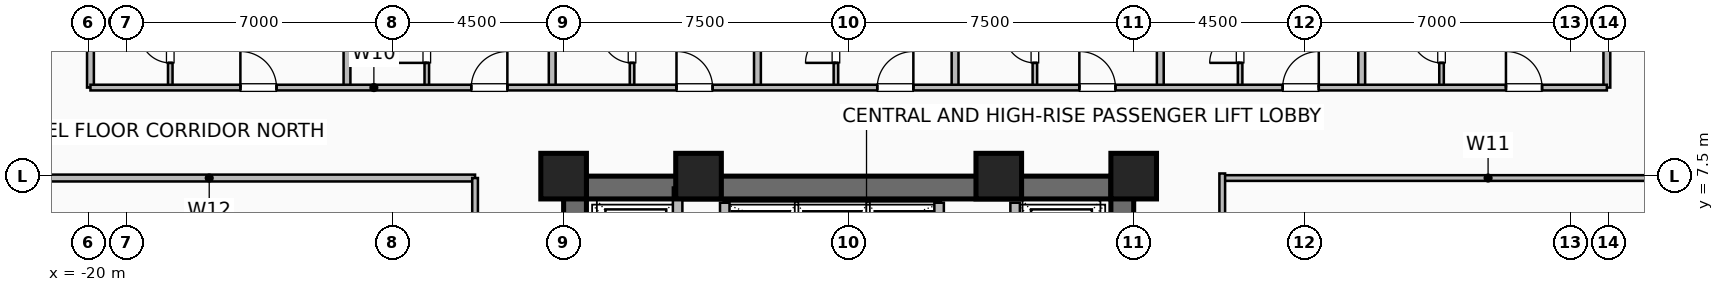
"""IFC4 building model, lengths in metres.
Left out: names, types, materials, properties, quantities, classifications, styles, units other than length and angle.
Written with IfcOpenShell. Run it as: python <this file> out.ifc"""

import sys

from ifc_helpers import new_model, si_unit, direction, frame, frame_2d, origin, origin_2d, place, context, subcontext, project, spatial, rectangle, hollow_rectangle, extrude, element, fill, save


model = new_model("IFC4")
c1 = context("Model", 3, precision=1e-05, world=origin(), true_north=direction((0.0, 1.0)))
c2 = subcontext(c1, "Body", "Model", "MODEL_VIEW")
j1 = project(units=[si_unit("LENGTHUNIT", "METRE"), si_unit("PLANEANGLEUNIT", "RADIAN")], contexts=[c1])
p1 = place(None, origin())
s1 = spatial("IfcSite", under=j1, at=p1, CompositionType="ELEMENT")
p2 = place(p1, origin())
s2 = spatial("IfcBuilding", under=s1, at=p2, CompositionType="ELEMENT")
p3 = place(p2, frame((0.0, 0.0, 27.0)))
s3 = spatial("IfcBuildingStorey", under=s2, at=p3, CompositionType="ELEMENT", Elevation=27.0)
for number, where, z_axis, x_axis in (
    (1, (7.5, 7.5, 0.0), (0.0, 0.0, 1.0), (1.0, 0.0, 0.0)),
    (2, (3.95, 7.5, 0.0), (0.0, 0.0, 1.0), (1.0, 0.0, 0.0)),
    (3, (-3.95, 7.5, 0.0), (0.0, 0.0, 1.0), (1.0, 0.0, 0.0)),
    (4, (-7.5, 7.5, 0.0), (0.0, 0.0, 1.0), (1.0, 0.0, 0.0)),
):
    element("IfcColumn", number, at=place(p3, frame(where, z_axis=z_axis, x_axis=x_axis)), inside=s3, PredefinedType="COLUMN", context=c2, shape_type="SweptSolid", body=[
        extrude(hollow_rectangle(XDim=1.2, YDim=1.2, WallThickness=0.055, at=origin_2d()), origin(), (0.0, 0.0, 1.0), 3.5),
    ])
p4 = place(p3, frame((-7.5, 7.2, 0.0), z_axis=(0.0, 0.0, 1.0), x_axis=(1.0, 0.0, 0.0)))
e5 = element("IfcWall", 5, at=p4, inside=s3, PredefinedType="SHEAR", context=c2, shape_type="SweptSolid", body=[
    extrude(rectangle(XDim=15.0, YDim=0.6, at=frame_2d((7.5, 0.0))), origin(), (0.0, 0.0, 1.0), 3.25),
])
p5 = place(p3, frame((-7.2, -7.5, 0.0), z_axis=(0.0, 0.0, 1.0), x_axis=(0.0, 1.0, 0.0)))
e6 = element("IfcWall", 6, at=p5, inside=s3, PredefinedType="SHEAR", context=c2, shape_type="SweptSolid", body=[
    extrude(rectangle(XDim=15.0, YDim=0.6, at=frame_2d((7.5, 0.0))), origin(), (0.0, 0.0, 1.0), 3.25),
])
p6 = place(p5, frame((9.5, 0.0, 0.0)))
e7 = element("IfcOpeningElement", 7, at=p6, cuts=e6, PredefinedType="OPENING", context=c2, shape_type="SweptSolid", body=[
    extrude(rectangle(XDim=1.0, YDim=2.08, at=frame_2d((0.5, 1.04))), frame((0.0, 0.31, 0.0), z_axis=(0.0, -1.0, 0.0), x_axis=(1.0, 0.0, 0.0)), (0.0, 0.0, 1.0), 0.62),
])
p7 = place(p3, frame((7.2, -7.5, 0.0), z_axis=(0.0, 0.0, 1.0), x_axis=(0.0, 1.0, 0.0)))
e8 = element("IfcWall", 8, at=p7, inside=s3, PredefinedType="SHEAR", context=c2, shape_type="SweptSolid", body=[
    extrude(rectangle(XDim=15.0, YDim=0.6, at=frame_2d((7.5, 0.0))), origin(), (0.0, 0.0, 1.0), 3.25),
])
for number, where, z_axis, x_axis in (
    (9, (-3.26, 4.58, 0.0), (0.0, 0.0, 1.0), (0.0, 1.0, 0.0)),
    (10, (2.38, 4.58, 0.0), (0.0, 0.0, 1.0), (0.0, 1.0, 0.0)),
):
    element("IfcWall", number, at=place(p3, frame(where, z_axis=z_axis, x_axis=x_axis)), inside=s3, PredefinedType="SHEAR", context=c2, shape_type="SweptSolid", body=[
        extrude(rectangle(XDim=2.22, YDim=0.25, at=frame_2d((1.11, 0.0))), origin(), (0.0, 0.0, 1.0), 3.25),
    ])
p8 = place(p3, frame((-4.5, 4.35, 0.0), z_axis=(0.0, 0.0, 1.0), x_axis=(0.0, 1.0, 0.0)))
e11 = element("IfcWall", 11, at=p8, inside=s3, PredefinedType="SHEAR", context=c2, shape_type="SweptSolid", body=[
    extrude(rectangle(XDim=2.85, YDim=0.25, at=frame_2d((1.425, 0.0))), origin(), (0.0, 0.0, 1.0), 3.25),
])
p9 = place(p3, frame((4.38, 4.3, 0.0), z_axis=(0.0, 0.0, 1.0), x_axis=(0.0, 1.0, 0.0)))
e12 = element("IfcWall", 12, at=p9, inside=s3, PredefinedType="SHEAR", context=c2, shape_type="SweptSolid", body=[
    extrude(rectangle(XDim=2.5, YDim=0.25, at=frame_2d((1.25, 0.0))), origin(), (0.0, 0.0, 1.0), 3.25),
])
p10 = place(p9, frame((0.8, 0.0, 0.0)))
e13 = element("IfcOpeningElement", 13, at=p10, cuts=e12, PredefinedType="OPENING", context=c2, shape_type="SweptSolid", body=[
    extrude(rectangle(XDim=1.2, YDim=2.2, at=frame_2d((0.6, 1.1))), frame((0.0, 0.135, 0.0), z_axis=(0.0, -1.0, 0.0), x_axis=(1.0, 0.0, 0.0)), (0.0, 0.0, 1.0), 0.27),
])
p11 = place(p3, frame((-17.85, 9.83, 0.0), z_axis=(0.0, 0.0, 1.0), x_axis=(0.0, 1.0, 0.0)))
e14 = element("IfcWall", 14, at=p11, inside=s3, PredefinedType="PLUMBINGWALL", context=c2, shape_type="SweptSolid", body=[
    extrude(rectangle(XDim=2.25, YDim=0.12, at=frame_2d((1.125, 0.0))), origin(), (0.0, 0.0, 1.0), 3.25),
])
p12 = place(p11, frame((0.65, 0.0, 0.0)))
e15 = element("IfcOpeningElement", 15, at=p12, cuts=e14, PredefinedType="OPENING", context=c2, shape_type="SweptSolid", body=[
    extrude(rectangle(XDim=0.8, YDim=2.05, at=frame_2d((0.4, 1.025))), frame((0.0, 0.07, 0.0), z_axis=(0.0, -1.0, 0.0), x_axis=(1.0, 0.0, 0.0)), (0.0, 0.0, 1.0), 0.14),
])
p13 = place(p3, frame((-11.1, 9.83, 0.0), z_axis=(0.0, 0.0, 1.0), x_axis=(0.0, 1.0, 0.0)))
e16 = element("IfcWall", 16, at=p13, inside=s3, PredefinedType="PLUMBINGWALL", context=c2, shape_type="SweptSolid", body=[
    extrude(rectangle(XDim=2.25, YDim=0.12, at=frame_2d((1.125, 0.0))), origin(), (0.0, 0.0, 1.0), 3.25),
])
p14 = place(p13, frame((0.65, 0.0, 0.0)))
e17 = element("IfcOpeningElement", 17, at=p14, cuts=e16, PredefinedType="OPENING", context=c2, shape_type="SweptSolid", body=[
    extrude(rectangle(XDim=0.8, YDim=2.05, at=frame_2d((0.4, 1.025))), frame((0.0, 0.07, 0.0), z_axis=(0.0, -1.0, 0.0), x_axis=(1.0, 0.0, 0.0)), (0.0, 0.0, 1.0), 0.14),
])
p15 = place(p3, frame((-5.7, 9.83, 0.0), z_axis=(0.0, 0.0, 1.0), x_axis=(0.0, 1.0, 0.0)))
e18 = element("IfcWall", 18, at=p15, inside=s3, PredefinedType="PLUMBINGWALL", context=c2, shape_type="SweptSolid", body=[
    extrude(rectangle(XDim=2.25, YDim=0.12, at=frame_2d((1.125, 0.0))), origin(), (0.0, 0.0, 1.0), 3.25),
])
p16 = place(p15, frame((0.65, 0.0, 0.0)))
e19 = element("IfcOpeningElement", 19, at=p16, cuts=e18, PredefinedType="OPENING", context=c2, shape_type="SweptSolid", body=[
    extrude(rectangle(XDim=0.8, YDim=2.05, at=frame_2d((0.4, 1.025))), frame((0.0, 0.07, 0.0), z_axis=(0.0, -1.0, 0.0), x_axis=(1.0, 0.0, 0.0)), (0.0, 0.0, 1.0), 0.14),
])
p17 = place(p3, frame((-0.335, 9.83, 0.0), z_axis=(0.0, 0.0, 1.0), x_axis=(0.0, 1.0, 0.0)))
e20 = element("IfcWall", 20, at=p17, inside=s3, PredefinedType="PLUMBINGWALL", context=c2, shape_type="SweptSolid", body=[
    extrude(rectangle(XDim=2.25, YDim=0.12, at=frame_2d((1.125, 0.0))), origin(), (0.0, 0.0, 1.0), 3.25),
])
p18 = place(p17, frame((0.65, 0.0, 0.0)))
e21 = element("IfcOpeningElement", 21, at=p18, cuts=e20, PredefinedType="OPENING", context=c2, shape_type="SweptSolid", body=[
    extrude(rectangle(XDim=0.8, YDim=2.05, at=frame_2d((0.4, 1.025))), frame((0.0, 0.07, 0.0), z_axis=(0.0, -1.0, 0.0), x_axis=(1.0, 0.0, 0.0)), (0.0, 0.0, 1.0), 0.14),
])
p19 = place(p3, frame((4.9, 9.83, 0.0), z_axis=(0.0, 0.0, 1.0), x_axis=(0.0, 1.0, 0.0)))
e22 = element("IfcWall", 22, at=p19, inside=s3, PredefinedType="PLUMBINGWALL", context=c2, shape_type="SweptSolid", body=[
    extrude(rectangle(XDim=2.25, YDim=0.12, at=frame_2d((1.125, 0.0))), origin(), (0.0, 0.0, 1.0), 2.818),
])
p20 = place(p19, frame((0.65, 0.0, 0.0)))
e23 = element("IfcOpeningElement", 23, at=p20, cuts=e22, PredefinedType="OPENING", context=c2, shape_type="SweptSolid", body=[
    extrude(rectangle(XDim=0.8, YDim=2.05, at=frame_2d((0.4, 1.025))), frame((0.0, 0.07, 0.0), z_axis=(0.0, -1.0, 0.0), x_axis=(1.0, 0.0, 0.0)), (0.0, 0.0, 1.0), 0.14),
])
p21 = place(p3, frame((10.3, 9.83, 0.0), z_axis=(0.0, 0.0, 1.0), x_axis=(0.0, 1.0, 0.0)))
e24 = element("IfcWall", 24, at=p21, inside=s3, PredefinedType="PLUMBINGWALL", context=c2, shape_type="SweptSolid", body=[
    extrude(rectangle(XDim=2.25, YDim=0.12, at=frame_2d((1.125, 0.0))), origin(), (0.0, 0.0, 1.0), 3.25),
])
p22 = place(p21, frame((0.65, 0.0, 0.0)))
e25 = element("IfcOpeningElement", 25, at=p22, cuts=e24, PredefinedType="OPENING", context=c2, shape_type="SweptSolid", body=[
    extrude(rectangle(XDim=0.8, YDim=2.05, at=frame_2d((0.4, 1.025))), frame((0.0, 0.07, 0.0), z_axis=(0.0, -1.0, 0.0), x_axis=(1.0, 0.0, 0.0)), (0.0, 0.0, 1.0), 0.14),
])
p23 = place(p3, frame((15.6, 9.83, 0.0), z_axis=(0.0, 0.0, 1.0), x_axis=(0.0, 1.0, 0.0)))
e26 = element("IfcWall", 26, at=p23, inside=s3, PredefinedType="PLUMBINGWALL", context=c2, shape_type="SweptSolid", body=[
    extrude(rectangle(XDim=2.25, YDim=0.12, at=frame_2d((1.125, 0.0))), origin(), (0.0, 0.0, 1.0), 3.25),
])
p24 = place(p23, frame((0.65, 0.0, 0.0)))
e27 = element("IfcOpeningElement", 27, at=p24, cuts=e26, PredefinedType="OPENING", context=c2, shape_type="SweptSolid", body=[
    extrude(rectangle(XDim=0.8, YDim=2.05, at=frame_2d((0.4, 1.025))), frame((0.0, 0.07, 0.0), z_axis=(0.0, -1.0, 0.0), x_axis=(1.0, 0.0, 0.0)), (0.0, 0.0, 1.0), 0.14),
])
for number, where, z_axis, x_axis in (
    (28, (-19.95, 9.83, 0.0), (0.0, 0.0, 1.0), (0.0, 1.0, 0.0)),
    (29, (-13.2, 9.83, 0.0), (0.0, 0.0, 1.0), (0.0, 1.0, 0.0)),
    (30, (-7.8, 9.83, 0.0), (0.0, 0.0, 1.0), (0.0, 1.0, 0.0)),
    (31, (-2.4, 9.83, 0.0), (0.0, 0.0, 1.0), (0.0, 1.0, 0.0)),
    (32, (2.8, 9.83, 0.0), (0.0, 0.0, 1.0), (0.0, 1.0, 0.0)),
    (33, (8.2, 9.83, 0.0), (0.0, 0.0, 1.0), (0.0, 1.0, 0.0)),
    (34, (13.5, 9.83, 0.0), (0.0, 0.0, 1.0), (0.0, 1.0, 0.0)),
    (35, (19.95, 9.83, 0.0), (0.0, 0.0, 1.0), (0.0, 1.0, 0.0)),
):
    element("IfcWall", number, at=place(p3, frame(where, z_axis=z_axis, x_axis=x_axis)), inside=s3, PredefinedType="PARTITIONING", context=c2, shape_type="SweptSolid", body=[
        extrude(rectangle(XDim=13.99, YDim=0.18, at=frame_2d((6.995, 0.0))), origin(), (0.0, 0.0, 1.0), 3.25),
    ])
p25 = place(p3, frame((-19.95, 9.83, 0.0), z_axis=(0.0, 0.0, 1.0), x_axis=(1.0, 0.0, 0.0)))
e36 = element("IfcWall", 36, at=p25, inside=s3, PredefinedType="PARTITIONING", context=c2, shape_type="SweptSolid", body=[
    extrude(rectangle(XDim=39.9, YDim=0.15, at=frame_2d((19.95, 0.0))), origin(), (0.0, 0.0, 1.0), 3.25),
])
p26 = place(p25, frame((3.945, 0.0, 0.0)))
e37 = element("IfcOpeningElement", 37, at=p26, cuts=e36, PredefinedType="OPENING", context=c2, shape_type="SweptSolid", body=[
    extrude(rectangle(XDim=0.95, YDim=2.08, at=frame_2d((0.475, 1.04))), frame((0.0, 0.085, 0.0), z_axis=(0.0, -1.0, 0.0), x_axis=(1.0, 0.0, 0.0)), (0.0, 0.0, 1.0), 0.17),
])
p27 = place(p25, frame((10.02, 0.0, 0.0)))
e38 = element("IfcOpeningElement", 38, at=p27, cuts=e36, PredefinedType="OPENING", context=c2, shape_type="SweptSolid", body=[
    extrude(rectangle(XDim=0.95, YDim=2.08, at=frame_2d((0.475, 1.04))), frame((0.0, 0.085, 0.0), z_axis=(0.0, -1.0, 0.0), x_axis=(1.0, 0.0, 0.0)), (0.0, 0.0, 1.0), 0.17),
])
p28 = place(p25, frame((15.42, 0.0, 0.0)))
e39 = element("IfcOpeningElement", 39, at=p28, cuts=e36, PredefinedType="OPENING", context=c2, shape_type="SweptSolid", body=[
    extrude(rectangle(XDim=0.95, YDim=2.08, at=frame_2d((0.475, 1.04))), frame((0.0, 0.085, 0.0), z_axis=(0.0, -1.0, 0.0), x_axis=(1.0, 0.0, 0.0)), (0.0, 0.0, 1.0), 0.17),
])
p29 = place(p25, frame((20.702, 0.0, 0.0)))
e40 = element("IfcOpeningElement", 40, at=p29, cuts=e36, PredefinedType="OPENING", context=c2, shape_type="SweptSolid", body=[
    extrude(rectangle(XDim=0.95, YDim=2.08, at=frame_2d((0.475, 1.04))), frame((0.0, 0.085, 0.0), z_axis=(0.0, -1.0, 0.0), x_axis=(1.0, 0.0, 0.0)), (0.0, 0.0, 1.0), 0.17),
])
p30 = place(p25, frame((26.02, 0.0, 0.0)))
e41 = element("IfcOpeningElement", 41, at=p30, cuts=e36, PredefinedType="OPENING", context=c2, shape_type="SweptSolid", body=[
    extrude(rectangle(XDim=0.95, YDim=2.08, at=frame_2d((0.475, 1.04))), frame((0.0, 0.085, 0.0), z_axis=(0.0, -1.0, 0.0), x_axis=(1.0, 0.0, 0.0)), (0.0, 0.0, 1.0), 0.17),
])
p31 = place(p25, frame((31.37, 0.0, 0.0)))
e42 = element("IfcOpeningElement", 42, at=p31, cuts=e36, PredefinedType="OPENING", context=c2, shape_type="SweptSolid", body=[
    extrude(rectangle(XDim=0.95, YDim=2.08, at=frame_2d((0.475, 1.04))), frame((0.0, 0.085, 0.0), z_axis=(0.0, -1.0, 0.0), x_axis=(1.0, 0.0, 0.0)), (0.0, 0.0, 1.0), 0.17),
])
p32 = place(p25, frame((37.245, 0.0, 0.0)))
e43 = element("IfcOpeningElement", 43, at=p32, cuts=e36, PredefinedType="OPENING", context=c2, shape_type="SweptSolid", body=[
    extrude(rectangle(XDim=0.95, YDim=2.08, at=frame_2d((0.475, 1.04))), frame((0.0, 0.085, 0.0), z_axis=(0.0, -1.0, 0.0), x_axis=(1.0, 0.0, 0.0)), (0.0, 0.0, 1.0), 0.17),
])
p33 = place(p3, frame((-23.82, 7.45, 0.0), z_axis=(0.0, 0.0, 1.0), x_axis=(1.0, 0.0, 0.0)))
e44 = element("IfcWall", 44, at=p33, inside=s3, PredefinedType="PARTITIONING", context=c2, shape_type="SweptSolid", body=[
    extrude(rectangle(XDim=13.99, YDim=0.18, at=frame_2d((6.995, 0.0))), origin(), (0.0, 0.0, 1.0), 3.25),
])
p34 = place(p3, frame((-9.83, -7.45, 0.0), z_axis=(0.0, 0.0, 1.0), x_axis=(0.0, 1.0, 0.0)))
e45 = element("IfcWall", 45, at=p34, inside=s3, PredefinedType="PARTITIONING", context=c2, shape_type="SweptSolid", body=[
    extrude(rectangle(XDim=14.9, YDim=0.15, at=frame_2d((7.45, 0.0))), origin(), (0.0, 0.0, 1.0), 3.25),
])
p35 = place(p34, frame((3.049, 0.0, 0.0)))
e46 = element("IfcOpeningElement", 46, at=p35, cuts=e45, PredefinedType="OPENING", context=c2, shape_type="SweptSolid", body=[
    extrude(rectangle(XDim=0.95, YDim=2.08, at=frame_2d((0.475, 1.04))), frame((0.0, 0.085, 0.0), z_axis=(0.0, -1.0, 0.0), x_axis=(1.0, 0.0, 0.0)), (0.0, 0.0, 1.0), 0.17),
])
p36 = place(p34, frame((7.927, 0.0, 0.0)))
e47 = element("IfcOpeningElement", 47, at=p36, cuts=e45, PredefinedType="OPENING", context=c2, shape_type="SweptSolid", body=[
    extrude(rectangle(XDim=0.95, YDim=2.08, at=frame_2d((0.475, 1.04))), frame((0.0, 0.085, 0.0), z_axis=(0.0, -1.0, 0.0), x_axis=(1.0, 0.0, 0.0)), (0.0, 0.0, 1.0), 0.17),
])
p37 = place(p34, frame((12.899, 0.0, 0.0)))
e48 = element("IfcOpeningElement", 48, at=p37, cuts=e45, PredefinedType="OPENING", context=c2, shape_type="SweptSolid", body=[
    extrude(rectangle(XDim=0.95, YDim=2.08, at=frame_2d((0.475, 1.04))), frame((0.0, 0.085, 0.0), z_axis=(0.0, -1.0, 0.0), x_axis=(1.0, 0.0, 0.0)), (0.0, 0.0, 1.0), 0.17),
])
p38 = place(p3, frame((9.83, 7.45, 0.0), z_axis=(0.0, 0.0, 1.0), x_axis=(1.0, 0.0, 0.0)))
e49 = element("IfcWall", 49, at=p38, inside=s3, PredefinedType="PARTITIONING", context=c2, shape_type="SweptSolid", body=[
    extrude(rectangle(XDim=13.99, YDim=0.15, at=frame_2d((6.995, 0.0))), origin(), (0.0, 0.0, 1.0), 3.25),
])
p39 = place(p3, frame((9.83, -7.57, 0.0), z_axis=(0.0, 0.0, 1.0), x_axis=(0.0, 1.0, 0.0)))
e50 = element("IfcWall", 50, at=p39, inside=s3, PredefinedType="PARTITIONING", context=c2, shape_type="SweptSolid", body=[
    extrude(rectangle(XDim=15.14, YDim=0.15, at=frame_2d((7.57, 0.0))), origin(), (0.0, 0.0, 1.0), 3.25),
])
p40 = place(p39, frame((1.62, 0.0, 0.0)))
e51 = element("IfcOpeningElement", 51, at=p40, cuts=e50, PredefinedType="OPENING", context=c2, shape_type="SweptSolid", body=[
    extrude(rectangle(XDim=0.95, YDim=2.06, at=frame_2d((0.475, 1.03))), frame((0.0, 0.085, 0.0), z_axis=(0.0, -1.0, 0.0), x_axis=(1.0, 0.0, 0.0)), (0.0, 0.0, 1.0), 0.17),
])
p41 = place(p39, frame((4.645, 0.0, 0.0)))
e52 = element("IfcOpeningElement", 52, at=p41, cuts=e50, PredefinedType="OPENING", context=c2, shape_type="SweptSolid", body=[
    extrude(rectangle(XDim=0.85, YDim=2.05, at=frame_2d((0.425, 1.025))), frame((0.0, 0.085, 0.0), z_axis=(0.0, -1.0, 0.0), x_axis=(1.0, 0.0, 0.0)), (0.0, 0.0, 1.0), 0.17),
])
p42 = place(p39, frame((7.745, 0.0, 0.0)))
e53 = element("IfcOpeningElement", 53, at=p42, cuts=e50, PredefinedType="OPENING", context=c2, shape_type="SweptSolid", body=[
    extrude(rectangle(XDim=0.95, YDim=2.06, at=frame_2d((0.475, 1.03))), frame((0.0, 0.085, 0.0), z_axis=(0.0, -1.0, 0.0), x_axis=(1.0, 0.0, 0.0)), (0.0, 0.0, 1.0), 0.17),
])
p43 = place(p39, frame((12.22, 0.0, 0.0)))
e54 = element("IfcOpeningElement", 54, at=p43, cuts=e50, PredefinedType="OPENING", context=c2, shape_type="SweptSolid", body=[
    extrude(rectangle(XDim=0.95, YDim=2.06, at=frame_2d((0.475, 1.03))), frame((0.0, 0.085, 0.0), z_axis=(0.0, -1.0, 0.0), x_axis=(1.0, 0.0, 0.0)), (0.0, 0.0, 1.0), 0.17),
])
p44 = place(p12, origin())
e55 = element("IfcDoor", 55, at=p44, inside=s3, OperationType="SINGLE_SWING_RIGHT", PredefinedType="DOOR", context=c2, shape_type="SweptSolid", body=[
    extrude(rectangle(XDim=0.8, YDim=2.05, at=frame_2d((0.4, 1.025))), frame((0.0, 0.025, 0.0), z_axis=(0.0, -1.0, 0.0), x_axis=(1.0, 0.0, 0.0)), (0.0, 0.0, 1.0), 0.05),
])
fill(e15, e55)
p45 = place(p14, origin())
e56 = element("IfcDoor", 56, at=p45, inside=s3, OperationType="SINGLE_SWING_LEFT", PredefinedType="DOOR", context=c2, shape_type="SweptSolid", body=[
    extrude(rectangle(XDim=0.8, YDim=2.05, at=frame_2d((0.4, 1.025))), frame((0.0, 0.025, 0.0), z_axis=(0.0, -1.0, 0.0), x_axis=(1.0, 0.0, 0.0)), (0.0, 0.0, 1.0), 0.05),
])
fill(e17, e56)
p46 = place(p16, origin())
e57 = element("IfcDoor", 57, at=p46, inside=s3, OperationType="SINGLE_SWING_RIGHT", PredefinedType="DOOR", context=c2, shape_type="SweptSolid", body=[
    extrude(rectangle(XDim=0.8, YDim=2.05, at=frame_2d((0.4, 1.025))), frame((0.0, 0.025, 0.0), z_axis=(0.0, -1.0, 0.0), x_axis=(1.0, 0.0, 0.0)), (0.0, 0.0, 1.0), 0.05),
])
fill(e19, e57)
p47 = place(p18, origin())
e58 = element("IfcDoor", 58, at=p47, inside=s3, OperationType="SINGLE_SWING_LEFT", PredefinedType="DOOR", context=c2, shape_type="SweptSolid", body=[
    extrude(rectangle(XDim=0.8, YDim=2.05, at=frame_2d((0.4, 1.025))), frame((0.0, 0.025, 0.0), z_axis=(0.0, -1.0, 0.0), x_axis=(1.0, 0.0, 0.0)), (0.0, 0.0, 1.0), 0.05),
])
fill(e21, e58)
p48 = place(p20, origin())
e59 = element("IfcDoor", 59, at=p48, inside=s3, OperationType="SINGLE_SWING_RIGHT", PredefinedType="DOOR", context=c2, shape_type="SweptSolid", body=[
    extrude(rectangle(XDim=0.8, YDim=2.05, at=frame_2d((0.4, 1.025))), frame((0.0, 0.025, 0.0), z_axis=(0.0, -1.0, 0.0), x_axis=(1.0, 0.0, 0.0)), (0.0, 0.0, 1.0), 0.05),
])
fill(e23, e59)
p49 = place(p22, origin())
e60 = element("IfcDoor", 60, at=p49, inside=s3, OperationType="SINGLE_SWING_LEFT", PredefinedType="DOOR", context=c2, shape_type="SweptSolid", body=[
    extrude(rectangle(XDim=0.8, YDim=2.05, at=frame_2d((0.4, 1.025))), frame((0.0, 0.025, 0.0), z_axis=(0.0, -1.0, 0.0), x_axis=(1.0, 0.0, 0.0)), (0.0, 0.0, 1.0), 0.05),
])
fill(e25, e60)
p50 = place(p24, origin())
e61 = element("IfcDoor", 61, at=p50, inside=s3, OperationType="SINGLE_SWING_RIGHT", PredefinedType="DOOR", context=c2, shape_type="SweptSolid", body=[
    extrude(rectangle(XDim=0.8, YDim=2.05, at=frame_2d((0.4, 1.025))), frame((0.0, 0.025, 0.0), z_axis=(0.0, -1.0, 0.0), x_axis=(1.0, 0.0, 0.0)), (0.0, 0.0, 1.0), 0.05),
])
fill(e27, e61)
p51 = place(p26, origin())
e62 = element("IfcDoor", 62, at=p51, inside=s3, OperationType="SINGLE_SWING_LEFT", PredefinedType="DOOR", context=c2, shape_type="SweptSolid", body=[
    extrude(rectangle(XDim=0.95, YDim=2.08, at=frame_2d((0.475, 1.04))), frame((0.0, 0.025, 0.0), z_axis=(0.0, -1.0, 0.0), x_axis=(1.0, 0.0, 0.0)), (0.0, 0.0, 1.0), 0.05),
])
fill(e37, e62)
p52 = place(p27, origin())
e63 = element("IfcDoor", 63, at=p52, inside=s3, OperationType="SINGLE_SWING_RIGHT", PredefinedType="DOOR", context=c2, shape_type="SweptSolid", body=[
    extrude(rectangle(XDim=0.95, YDim=2.08, at=frame_2d((0.475, 1.04))), frame((0.0, 0.025, 0.0), z_axis=(0.0, -1.0, 0.0), x_axis=(1.0, 0.0, 0.0)), (0.0, 0.0, 1.0), 0.05),
])
fill(e38, e63)
p53 = place(p28, origin())
e64 = element("IfcDoor", 64, at=p53, inside=s3, OperationType="SINGLE_SWING_LEFT", PredefinedType="DOOR", context=c2, shape_type="SweptSolid", body=[
    extrude(rectangle(XDim=0.95, YDim=2.08, at=frame_2d((0.475, 1.04))), frame((0.0, 0.025, 0.0), z_axis=(0.0, -1.0, 0.0), x_axis=(1.0, 0.0, 0.0)), (0.0, 0.0, 1.0), 0.05),
])
fill(e39, e64)
p54 = place(p29, origin())
e65 = element("IfcDoor", 65, at=p54, inside=s3, OperationType="SINGLE_SWING_RIGHT", PredefinedType="DOOR", context=c2, shape_type="SweptSolid", body=[
    extrude(rectangle(XDim=0.95, YDim=2.08, at=frame_2d((0.475, 1.04))), frame((0.0, 0.025, 0.0), z_axis=(0.0, -1.0, 0.0), x_axis=(1.0, 0.0, 0.0)), (0.0, 0.0, 1.0), 0.05),
])
fill(e40, e65)
p55 = place(p30, origin())
e66 = element("IfcDoor", 66, at=p55, inside=s3, OperationType="SINGLE_SWING_LEFT", PredefinedType="DOOR", context=c2, shape_type="SweptSolid", body=[
    extrude(rectangle(XDim=0.95, YDim=2.08, at=frame_2d((0.475, 1.04))), frame((0.0, 0.025, 0.0), z_axis=(0.0, -1.0, 0.0), x_axis=(1.0, 0.0, 0.0)), (0.0, 0.0, 1.0), 0.05),
])
fill(e41, e66)
p56 = place(p31, origin())
e67 = element("IfcDoor", 67, at=p56, inside=s3, OperationType="SINGLE_SWING_RIGHT", PredefinedType="DOOR", context=c2, shape_type="SweptSolid", body=[
    extrude(rectangle(XDim=0.95, YDim=2.08, at=frame_2d((0.475, 1.04))), frame((0.0, 0.025, 0.0), z_axis=(0.0, -1.0, 0.0), x_axis=(1.0, 0.0, 0.0)), (0.0, 0.0, 1.0), 0.05),
])
fill(e42, e67)
p57 = place(p32, origin())
e68 = element("IfcDoor", 68, at=p57, inside=s3, OperationType="SINGLE_SWING_LEFT", PredefinedType="DOOR", context=c2, shape_type="SweptSolid", body=[
    extrude(rectangle(XDim=0.95, YDim=2.08, at=frame_2d((0.475, 1.04))), frame((0.0, 0.025, 0.0), z_axis=(0.0, -1.0, 0.0), x_axis=(1.0, 0.0, 0.0)), (0.0, 0.0, 1.0), 0.05),
])
fill(e43, e68)
save(model, sys.argv[1])
